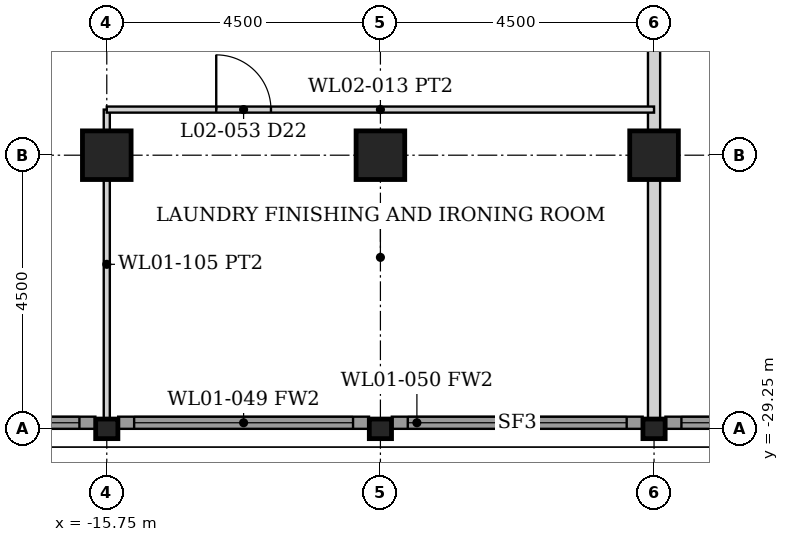
"""IFC4 building model, lengths in metres.
Left out: names, types, materials, properties, quantities, classifications, styles, units other than length and angle.
Written with IfcOpenShell. Run it as: python <this file> out.ifc"""

import sys

from ifc_helpers import new_model, si_unit, direction, frame, frame_2d, origin, origin_2d, place, context, subcontext, project, spatial, rectangle, hollow_rectangle, i_section, extrude, element, fill, save


model = new_model("IFC4")
c1 = context("Model", 3, precision=1e-05, world=origin(), true_north=direction((0.0, 1.0)))
c2 = subcontext(c1, "Body", "Model", "MODEL_VIEW")
j1 = project(units=[si_unit("LENGTHUNIT", "METRE"), si_unit("PLANEANGLEUNIT", "RADIAN")], contexts=[c1])
p1 = place(None, origin())
s1 = spatial("IfcSite", under=j1, at=p1, CompositionType="ELEMENT")
p2 = place(p1, origin())
s2 = spatial("IfcBuilding", under=s1, at=p2, CompositionType="ELEMENT")
p3 = place(p2, frame((0.0, 0.0, 11.0)))
s3 = spatial("IfcBuildingStorey", under=s2, at=p3, CompositionType="ELEMENT", Elevation=11.0)
for number, where, z_axis, x_axis in (
    (1, (-15.75, -24.75, 0.0), (0.0, 0.0, 1.0), (0.0, 1.0, 0.0)),
    (2, (-11.25, -24.75, 0.0), (0.0, 0.0, 1.0), (0.0, 1.0, 0.0)),
    (3, (-6.75, -24.75, 0.0), (0.0, 0.0, 1.0), (0.0, 1.0, 0.0)),
):
    element("IfcColumn", number, at=place(p3, frame(where, z_axis=z_axis, x_axis=x_axis)), inside=s3, PredefinedType="COLUMN", context=c2, shape_type="SweptSolid", body=[
        extrude(hollow_rectangle(XDim=0.8, YDim=0.8, WallThickness=0.08, at=origin_2d()), origin(), (0.0, 0.0, 1.0), 5.0),
    ])
for number, where, z_axis, x_axis in (
    (4, (-15.75, -29.25, 0.0), (0.0, 0.0, 1.0), (0.0, 1.0, 0.0)),
    (5, (-11.25, -29.25, 0.0), (0.0, 0.0, 1.0), (0.0, 1.0, 0.0)),
    (6, (-6.75, -29.25, 0.0), (0.0, 0.0, 1.0), (0.0, 1.0, 0.0)),
):
    element("IfcColumn", number, at=place(p3, frame(where, z_axis=z_axis, x_axis=x_axis)), inside=s3, PredefinedType="COLUMN", context=c2, shape_type="SweptSolid", body=[
        extrude(i_section(OverallWidth=0.322, OverallDepth=0.365, WebThickness=0.027, FlangeThickness=0.044, FilletRadius=0.015, at=origin_2d()), origin(), (0.0, 0.0, 1.0), 5.0),
    ])
p4 = place(p3, frame((-20.062, -29.15, 0.0), z_axis=(0.0, 0.0, 1.0), x_axis=(1.0, 0.0, 0.0)))
e7 = element("IfcWall", 7, at=p4, inside=s3, PredefinedType="SOLIDWALL", context=c2, shape_type="SweptSolid", body=[
    extrude(rectangle(XDim=4.125, YDim=0.2, at=frame_2d((2.062, 0.0))), origin(), (0.0, 0.0, 1.0), 4.133),
])
p5 = place(p4, frame((0.262, 0.0, 0.15)))
e8 = element("IfcOpeningElement", 8, at=p5, cuts=e7, PredefinedType="OPENING", context=c2, shape_type="SweptSolid", body=[
    extrude(rectangle(XDim=3.6, YDim=3.833, at=frame_2d((1.8, 1.917))), frame((0.0, 0.11, 0.0), z_axis=(0.0, -1.0, 0.0), x_axis=(1.0, 0.0, 0.0)), (0.0, 0.0, 1.0), 0.22),
])
p6 = place(p3, frame((-15.562, -29.15, 0.0), z_axis=(0.0, 0.0, 1.0), x_axis=(1.0, 0.0, 0.0)))
e9 = element("IfcWall", 9, at=p6, inside=s3, PredefinedType="SOLIDWALL", context=c2, shape_type="SweptSolid", body=[
    extrude(rectangle(XDim=4.125, YDim=0.2, at=frame_2d((2.062, 0.0))), origin(), (0.0, 0.0, 1.0), 4.133),
])
p7 = place(p6, frame((0.262, 0.0, 0.15)))
e10 = element("IfcOpeningElement", 10, at=p7, cuts=e9, PredefinedType="OPENING", context=c2, shape_type="SweptSolid", body=[
    extrude(rectangle(XDim=3.6, YDim=3.833, at=frame_2d((1.8, 1.917))), frame((0.0, 0.11, 0.0), z_axis=(0.0, -1.0, 0.0), x_axis=(1.0, 0.0, 0.0)), (0.0, 0.0, 1.0), 0.22),
])
p8 = place(p3, frame((-11.062, -29.15, 0.0), z_axis=(0.0, 0.0, 1.0), x_axis=(1.0, 0.0, 0.0)))
e11 = element("IfcWall", 11, at=p8, inside=s3, PredefinedType="SOLIDWALL", context=c2, shape_type="SweptSolid", body=[
    extrude(rectangle(XDim=4.125, YDim=0.2, at=frame_2d((2.062, 0.0))), origin(), (0.0, 0.0, 1.0), 4.133),
])
p9 = place(p8, frame((0.262, 0.0, 0.15)))
e12 = element("IfcOpeningElement", 12, at=p9, cuts=e11, PredefinedType="OPENING", context=c2, shape_type="SweptSolid", body=[
    extrude(rectangle(XDim=3.6, YDim=3.833, at=frame_2d((1.8, 1.917))), frame((0.0, 0.11, 0.0), z_axis=(0.0, -1.0, 0.0), x_axis=(1.0, 0.0, 0.0)), (0.0, 0.0, 1.0), 0.22),
])
p10 = place(p3, frame((-6.562, -29.15, 0.0), z_axis=(0.0, 0.0, 1.0), x_axis=(1.0, 0.0, 0.0)))
e13 = element("IfcWall", 13, at=p10, inside=s3, PredefinedType="SOLIDWALL", context=c2, shape_type="SweptSolid", body=[
    extrude(rectangle(XDim=4.125, YDim=0.2, at=frame_2d((2.062, 0.0))), origin(), (0.0, 0.0, 1.0), 4.133),
])
p11 = place(p10, frame((0.262, 0.0, 0.15)))
e14 = element("IfcOpeningElement", 14, at=p11, cuts=e13, PredefinedType="OPENING", context=c2, shape_type="SweptSolid", body=[
    extrude(rectangle(XDim=3.6, YDim=3.833, at=frame_2d((1.8, 1.917))), frame((0.0, 0.11, 0.0), z_axis=(0.0, -1.0, 0.0), x_axis=(1.0, 0.0, 0.0)), (0.0, 0.0, 1.0), 0.22),
])
p12 = place(p3, frame((-6.75, -29.089, 0.0), z_axis=(0.0, 0.0, 1.0), x_axis=(0.0, 1.0, 0.0)))
e15 = element("IfcWall", 15, at=p12, inside=s3, PredefinedType="PARTITIONING", context=c2, shape_type="SweptSolid", body=[
    extrude(rectangle(XDim=19.889, YDim=0.2, at=frame_2d((9.944, 0.0))), origin(), (0.0, 0.0, 1.0), 3.829),
])
p13 = place(p3, frame((-15.75, -29.089, 0.0), z_axis=(0.0, 0.0, 1.0), x_axis=(0.0, 1.0, 0.0)))
e16 = element("IfcWall", 16, at=p13, inside=s3, PredefinedType="PARTITIONING", context=c2, shape_type="SweptSolid", body=[
    extrude(rectangle(XDim=5.089, YDim=0.1, at=frame_2d((2.544, 0.0))), origin(), (0.0, 0.0, 1.0), 3.829),
])
p14 = place(p3, frame((-15.75, -24.0, 0.0), z_axis=(0.0, 0.0, 1.0), x_axis=(1.0, 0.0, 0.0)))
e17 = element("IfcWall", 17, at=p14, inside=s3, PredefinedType="PARTITIONING", context=c2, shape_type="SweptSolid", body=[
    extrude(rectangle(XDim=9.0, YDim=0.1, at=frame_2d((4.5, 0.0))), origin(), (0.0, 0.0, 1.0), 3.829),
])
p15 = place(p14, frame((1.8, 0.0, 0.0)))
e18 = element("IfcOpeningElement", 18, at=p15, cuts=e17, PredefinedType="OPENING", context=c2, shape_type="SweptSolid", body=[
    extrude(rectangle(XDim=0.9, YDim=2.1, at=frame_2d((0.45, 1.05))), frame((0.0, 0.06, 0.0), z_axis=(0.0, -1.0, 0.0), x_axis=(1.0, 0.0, 0.0)), (0.0, 0.0, 1.0), 0.12),
])
p16 = place(p5, origin())
e19 = element("IfcWindow", 19, at=p16, inside=s3, PartitioningType="SINGLE_PANEL", PredefinedType="WINDOW", context=c2, shape_type="SweptSolid", body=[
    extrude(rectangle(XDim=3.6, YDim=3.833, at=frame_2d((1.8, 1.917))), frame((0.0, 0.03, 0.0), z_axis=(0.0, -1.0, 0.0), x_axis=(1.0, 0.0, 0.0)), (0.0, 0.0, 1.0), 0.06),
])
fill(e8, e19)
p17 = place(p7, origin())
e20 = element("IfcWindow", 20, at=p17, inside=s3, PartitioningType="SINGLE_PANEL", PredefinedType="WINDOW", context=c2, shape_type="SweptSolid", body=[
    extrude(rectangle(XDim=3.6, YDim=3.833, at=frame_2d((1.8, 1.917))), frame((0.0, 0.03, 0.0), z_axis=(0.0, -1.0, 0.0), x_axis=(1.0, 0.0, 0.0)), (0.0, 0.0, 1.0), 0.06),
])
fill(e10, e20)
p18 = place(p9, origin())
e21 = element("IfcWindow", 21, at=p18, inside=s3, PartitioningType="SINGLE_PANEL", PredefinedType="WINDOW", context=c2, shape_type="SweptSolid", body=[
    extrude(rectangle(XDim=3.6, YDim=3.833, at=frame_2d((1.8, 1.917))), frame((0.0, 0.03, 0.0), z_axis=(0.0, -1.0, 0.0), x_axis=(1.0, 0.0, 0.0)), (0.0, 0.0, 1.0), 0.06),
])
fill(e12, e21)
p19 = place(p11, origin())
e22 = element("IfcWindow", 22, at=p19, inside=s3, PartitioningType="SINGLE_PANEL", PredefinedType="WINDOW", context=c2, shape_type="SweptSolid", body=[
    extrude(rectangle(XDim=3.6, YDim=3.833, at=frame_2d((1.8, 1.917))), frame((0.0, 0.03, 0.0), z_axis=(0.0, -1.0, 0.0), x_axis=(1.0, 0.0, 0.0)), (0.0, 0.0, 1.0), 0.06),
])
fill(e14, e22)
p20 = place(p15, origin())
e23 = element("IfcDoor", 23, at=p20, inside=s3, OperationType="SINGLE_SWING_LEFT", PredefinedType="DOOR", context=c2, shape_type="SweptSolid", body=[
    extrude(rectangle(XDim=0.9, YDim=2.1, at=frame_2d((0.45, 1.05))), frame((0.0, 0.025, 0.0), z_axis=(0.0, -1.0, 0.0), x_axis=(1.0, 0.0, 0.0)), (0.0, 0.0, 1.0), 0.05),
])
fill(e18, e23)
save(model, sys.argv[1])
